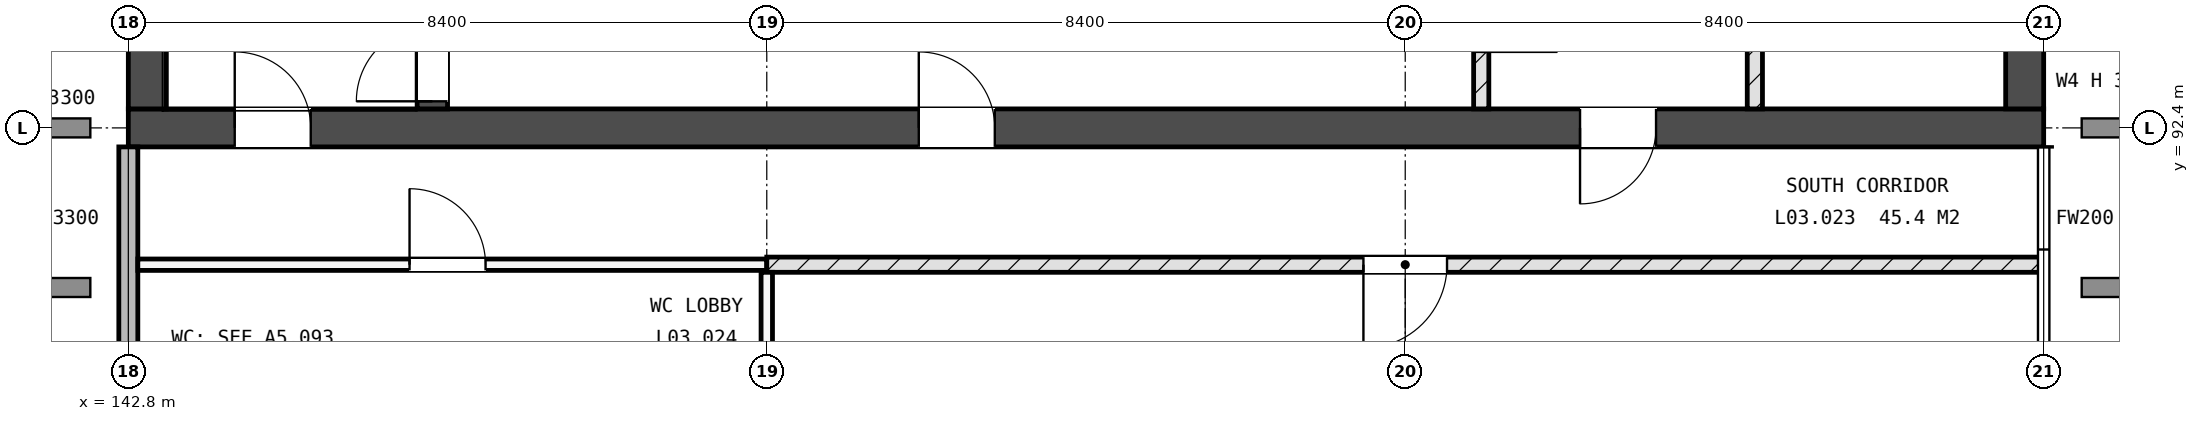
"""IFC4 building model, lengths in metres.
Left out: names, types, materials, properties, quantities, classifications, styles, units other than length and angle.
Written with IfcOpenShell. Run it as: python <this file> out.ifc"""

import sys

from ifc_helpers import new_model, si_unit, direction, frame, frame_2d, origin, place, context, subcontext, project, spatial, rectangle, extrude, element, fill, save


model = new_model("IFC4")
c1 = context("Model", 3, precision=1e-05, world=origin(), true_north=direction((0.0, 1.0)))
c2 = subcontext(c1, "Body", "Model", "MODEL_VIEW")
j1 = project(units=[si_unit("LENGTHUNIT", "METRE"), si_unit("PLANEANGLEUNIT", "RADIAN")], contexts=[c1])
p1 = place(None, origin())
s1 = spatial("IfcSite", under=j1, at=p1, CompositionType="ELEMENT")
p2 = place(p1, origin())
s2 = spatial("IfcBuilding", under=s1, at=p2, CompositionType="ELEMENT")
p3 = place(p2, frame((0.0, 0.0, 14.4)))
s3 = spatial("IfcBuildingStorey", under=s2, at=p3, CompositionType="ELEMENT", Elevation=14.4)
p4 = place(p3, frame((142.8, 92.4, -0.3), z_axis=(0.0, 0.0, 1.0), x_axis=(1.0, 0.0, 0.0)))
e1 = element("IfcWall", 1, at=p4, inside=s3, PredefinedType="SHEAR", context=c2, shape_type="SweptSolid", body=[
    extrude(rectangle(XDim=25.2, YDim=0.5, at=frame_2d((12.6, 0.0))), origin(), (0.0, 0.0, 1.0), 3.65),
])
p5 = place(p4, frame((1.4, 0.0, 0.3)))
e2 = element("IfcOpeningElement", 2, at=p5, cuts=e1, PredefinedType="OPENING", context=c2, shape_type="SweptSolid", body=[
    extrude(rectangle(XDim=1.0, YDim=2.1, at=frame_2d((0.5, 1.05))), frame((0.0, 0.26, 0.0), z_axis=(0.0, -1.0, 0.0), x_axis=(1.0, 0.0, 0.0)), (0.0, 0.0, 1.0), 0.52),
])
p6 = place(p4, frame((19.1, 0.0, 0.3)))
e3 = element("IfcOpeningElement", 3, at=p6, cuts=e1, PredefinedType="OPENING", context=c2, shape_type="SweptSolid", body=[
    extrude(rectangle(XDim=1.0, YDim=2.1, at=frame_2d((0.5, 1.05))), frame((0.0, 0.26, 0.0), z_axis=(0.0, -1.0, 0.0), x_axis=(1.0, 0.0, 0.0)), (0.0, 0.0, 1.0), 0.52),
])
p7 = place(p4, frame((10.4, 0.0, 0.3)))
e4 = element("IfcOpeningElement", 4, at=p7, cuts=e1, PredefinedType="OPENING", context=c2, shape_type="SweptSolid", body=[
    extrude(rectangle(XDim=1.0, YDim=2.1, at=frame_2d((0.5, 1.05))), frame((0.0, 0.26, 0.0), z_axis=(0.0, -1.0, 0.0), x_axis=(1.0, 0.0, 0.0)), (0.0, 0.0, 1.0), 0.52),
])
p8 = place(p3, frame((143.05, 92.65, -0.3), z_axis=(0.0, 0.0, 1.0), x_axis=(0.0, 1.0, 0.0)))
e5 = element("IfcWall", 5, at=p8, inside=s3, PredefinedType="SHEAR", context=c2, shape_type="SweptSolid", body=[
    extrude(rectangle(XDim=16.3, YDim=0.5, at=frame_2d((8.15, 0.0))), origin(), (0.0, 0.0, 1.0), 3.65),
])
p9 = place(p8, frame((2.95, 0.0, 1.9)))
e6 = element("IfcOpeningElement", 6, at=p9, cuts=e5, PredefinedType="OPENING", context=c2, shape_type="SweptSolid", body=[
    extrude(rectangle(XDim=1.2, YDim=0.9, at=frame_2d((0.6, 0.45))), frame((0.0, 0.26, 0.0), z_axis=(0.0, -1.0, 0.0), x_axis=(1.0, 0.0, 0.0)), (0.0, 0.0, 1.0), 0.52),
])
p10 = place(p3, frame((167.75, 92.65, -0.3), z_axis=(0.0, 0.0, 1.0), x_axis=(0.0, 1.0, 0.0)))
e7 = element("IfcWall", 7, at=p10, inside=s3, PredefinedType="SHEAR", context=c2, shape_type="SweptSolid", body=[
    extrude(rectangle(XDim=16.3, YDim=0.5, at=frame_2d((8.15, 0.0))), origin(), (0.0, 0.0, 1.0), 3.65),
])
p11 = place(p10, frame((12.15, 0.0, 1.9)))
e8 = element("IfcOpeningElement", 8, at=p11, cuts=e7, PredefinedType="OPENING", context=c2, shape_type="SweptSolid", body=[
    extrude(rectangle(XDim=1.2, YDim=0.9, at=frame_2d((0.6, 0.45))), frame((0.0, 0.26, 0.0), z_axis=(0.0, -1.0, 0.0), x_axis=(1.0, 0.0, 0.0)), (0.0, 0.0, 1.0), 0.52),
])
p12 = place(p3, frame((146.8, 92.65, -0.3), z_axis=(0.0, 0.0, 1.0), x_axis=(0.0, 1.0, 0.0)))
e9 = element("IfcWall", 9, at=p12, inside=s3, PredefinedType="SHEAR", context=c2, shape_type="SweptSolid", body=[
    extrude(rectangle(XDim=7.475, YDim=0.4, at=frame_2d((3.738, 0.0))), origin(), (0.0, 0.0, 1.0), 3.65),
])
p13 = place(p12, frame((0.1, 0.0, 0.3)))
e10 = element("IfcOpeningElement", 10, at=p13, cuts=e9, PredefinedType="OPENING", context=c2, shape_type="SweptSolid", body=[
    extrude(rectangle(XDim=1.0, YDim=2.1, at=frame_2d((0.5, 1.05))), frame((0.0, 0.21, 0.0), z_axis=(0.0, -1.0, 0.0), x_axis=(1.0, 0.0, 0.0)), (0.0, 0.0, 1.0), 0.42),
])
p14 = place(p3, frame((142.8, 84.5, 0.0), z_axis=(0.0, 0.0, 1.0), x_axis=(0.0, 1.0, 0.0)))
e11 = element("IfcWall", 11, at=p14, inside=s3, PredefinedType="STANDARD", context=c2, shape_type="SweptSolid", body=[
    extrude(rectangle(XDim=7.65, YDim=0.25, at=frame_2d((3.825, 0.0))), origin(), (0.0, 0.0, 1.0), 3.3),
])
p15 = place(p14, frame((2.2, 0.0, 2.1)))
e12 = element("IfcOpeningElement", 12, at=p15, cuts=e11, PredefinedType="OPENING", context=c2, shape_type="SweptSolid", body=[
    extrude(rectangle(XDim=0.9, YDim=0.6, at=frame_2d((0.45, 0.3))), frame((0.0, 0.135, 0.0), z_axis=(0.0, -1.0, 0.0), x_axis=(1.0, 0.0, 0.0)), (0.0, 0.0, 1.0), 0.27),
])
p16 = place(p3, frame((142.925, 90.6, 0.0), z_axis=(0.0, 0.0, 1.0), x_axis=(1.0, 0.0, 0.0)))
e13 = element("IfcWall", 13, at=p16, inside=s3, PredefinedType="PARTITIONING", context=c2, shape_type="SweptSolid", body=[
    extrude(rectangle(XDim=8.275, YDim=0.15, at=frame_2d((4.137, 0.0))), origin(), (0.0, 0.0, 1.0), 3.3),
])
p17 = place(p16, frame((3.575, 0.0, 0.0)))
e14 = element("IfcOpeningElement", 14, at=p17, cuts=e13, PredefinedType="OPENING", context=c2, shape_type="SweptSolid", body=[
    extrude(rectangle(XDim=1.0, YDim=2.1, at=frame_2d((0.5, 1.05))), frame((0.0, 0.085, 0.0), z_axis=(0.0, -1.0, 0.0), x_axis=(1.0, 0.0, 0.0)), (0.0, 0.0, 1.0), 0.17),
])
p18 = place(p3, frame((151.2, 90.6, 0.0), z_axis=(0.0, 0.0, 1.0), x_axis=(1.0, 0.0, 0.0)))
e15 = element("IfcWall", 15, at=p18, inside=s3, PredefinedType="SOLIDWALL", context=c2, shape_type="SweptSolid", body=[
    extrude(rectangle(XDim=16.8, YDim=0.2, at=frame_2d((8.4, 0.0))), origin(), (0.0, 0.0, 1.0), 3.3),
])
p19 = place(p18, frame((7.85, 0.0, 0.0)))
e16 = element("IfcOpeningElement", 16, at=p19, cuts=e15, PredefinedType="OPENING", context=c2, shape_type="SweptSolid", body=[
    extrude(rectangle(XDim=1.1, YDim=2.25, at=frame_2d((0.55, 1.125))), frame((0.0, 0.11, 0.0), z_axis=(0.0, -1.0, 0.0), x_axis=(1.0, 0.0, 0.0)), (0.0, 0.0, 1.0), 0.22),
])
p20 = place(p3, frame((151.2, 84.0, 0.0), z_axis=(0.0, 0.0, 1.0), x_axis=(0.0, 1.0, 0.0)))
e17 = element("IfcWall", 17, at=p20, inside=s3, PredefinedType="PARTITIONING", context=c2, shape_type="SweptSolid", body=[
    extrude(rectangle(XDim=6.5, YDim=0.15, at=frame_2d((3.25, 0.0))), origin(), (0.0, 0.0, 1.0), 2.5),
])
p21 = place(p3, frame((160.6, 92.65, 0.0), z_axis=(0.0, 0.0, 1.0), x_axis=(0.0, 1.0, 0.0)))
e18 = element("IfcWall", 18, at=p21, inside=s3, PredefinedType="SOLIDWALL", context=c2, shape_type="SweptSolid", body=[
    extrude(rectangle(XDim=12.45, YDim=0.2, at=frame_2d((6.225, 0.0))), origin(), (0.0, 0.0, 1.0), 3.3),
])
p22 = place(p21, frame((5.05, 0.0, 0.0)))
e19 = element("IfcOpeningElement", 19, at=p22, cuts=e18, PredefinedType="OPENING", context=c2, shape_type="SweptSolid", body=[
    extrude(rectangle(XDim=0.8, YDim=2.1, at=frame_2d((0.4, 1.05))), frame((0.0, 0.11, 0.0), z_axis=(0.0, -1.0, 0.0), x_axis=(1.0, 0.0, 0.0)), (0.0, 0.0, 1.0), 0.22),
])
p23 = place(p21, frame((0.75, 0.0, 0.0)))
e20 = element("IfcOpeningElement", 20, at=p23, cuts=e18, PredefinedType="OPENING", context=c2, shape_type="SweptSolid", body=[
    extrude(rectangle(XDim=1.0, YDim=2.1, at=frame_2d((0.5, 1.05))), frame((0.0, 0.11, 0.0), z_axis=(0.0, -1.0, 0.0), x_axis=(1.0, 0.0, 0.0)), (0.0, 0.0, 1.0), 0.22),
])
p24 = place(p3, frame((164.2, 92.65, 0.0), z_axis=(0.0, 0.0, 1.0), x_axis=(0.0, 1.0, 0.0)))
e21 = element("IfcWall", 21, at=p24, inside=s3, PredefinedType="SOLIDWALL", context=c2, shape_type="SweptSolid", body=[
    extrude(rectangle(XDim=8.7, YDim=0.2, at=frame_2d((4.35, 0.0))), origin(), (0.0, 0.0, 1.0), 3.3),
])
p25 = place(p24, frame((1.65, 0.0, 0.0)))
e22 = element("IfcOpeningElement", 22, at=p25, cuts=e21, PredefinedType="OPENING", context=c2, shape_type="SweptSolid", body=[
    extrude(rectangle(XDim=0.8, YDim=2.1, at=frame_2d((0.4, 1.05))), frame((0.0, 0.11, 0.0), z_axis=(0.0, -1.0, 0.0), x_axis=(1.0, 0.0, 0.0)), (0.0, 0.0, 1.0), 0.22),
])
p26 = place(p24, frame((6.25, 0.0, 0.0)))
e23 = element("IfcOpeningElement", 23, at=p26, cuts=e21, PredefinedType="OPENING", context=c2, shape_type="SweptSolid", body=[
    extrude(rectangle(XDim=0.8, YDim=2.1, at=frame_2d((0.4, 1.05))), frame((0.0, 0.11, 0.0), z_axis=(0.0, -1.0, 0.0), x_axis=(1.0, 0.0, 0.0)), (0.0, 0.0, 1.0), 0.22),
])
p27 = place(p5, origin())
e24 = element("IfcDoor", 24, at=p27, inside=s3, OperationType="SINGLE_SWING_RIGHT", PredefinedType="DOOR", context=c2, shape_type="SweptSolid", body=[
    extrude(rectangle(XDim=1.0, YDim=2.1, at=frame_2d((0.5, 1.05))), frame((0.0, 0.025, 0.0), z_axis=(0.0, -1.0, 0.0), x_axis=(1.0, 0.0, 0.0)), (0.0, 0.0, 1.0), 0.05),
])
fill(e2, e24)
p28 = place(p13, origin())
e25 = element("IfcDoor", 25, at=p28, inside=s3, OperationType="SINGLE_SWING_RIGHT", PredefinedType="DOOR", context=c2, shape_type="SweptSolid", body=[
    extrude(rectangle(XDim=1.0, YDim=2.1, at=frame_2d((0.5, 1.05))), frame((0.0, 0.025, 0.0), z_axis=(0.0, -1.0, 0.0), x_axis=(1.0, 0.0, 0.0)), (0.0, 0.0, 1.0), 0.05),
])
fill(e10, e25)
p29 = place(p19, origin())
e26 = element("IfcDoor", 26, at=p29, inside=s3, OperationType="SINGLE_SWING_LEFT", PredefinedType="DOOR", context=c2, shape_type="SweptSolid", body=[
    extrude(rectangle(XDim=1.1, YDim=2.25, at=frame_2d((0.55, 1.125))), frame((0.0, 0.025, 0.0), z_axis=(0.0, -1.0, 0.0), x_axis=(1.0, 0.0, 0.0)), (0.0, 0.0, 1.0), 0.05),
])
fill(e16, e26)
p30 = place(p17, origin())
e27 = element("IfcDoor", 27, at=p30, inside=s3, OperationType="SINGLE_SWING_RIGHT", PredefinedType="DOOR", context=c2, shape_type="SweptSolid", body=[
    extrude(rectangle(XDim=1.0, YDim=2.1, at=frame_2d((0.5, 1.05))), frame((0.0, 0.025, 0.0), z_axis=(0.0, -1.0, 0.0), x_axis=(1.0, 0.0, 0.0)), (0.0, 0.0, 1.0), 0.05),
])
fill(e14, e27)
p31 = place(p6, origin())
e28 = element("IfcDoor", 28, at=p31, inside=s3, OperationType="SINGLE_SWING_LEFT", PredefinedType="DOOR", context=c2, shape_type="SweptSolid", body=[
    extrude(rectangle(XDim=1.0, YDim=2.1, at=frame_2d((0.5, 1.05))), frame((0.0, 0.025, 0.0), z_axis=(0.0, -1.0, 0.0), x_axis=(1.0, 0.0, 0.0)), (0.0, 0.0, 1.0), 0.05),
])
fill(e3, e28)
p32 = place(p7, origin())
e29 = element("IfcDoor", 29, at=p32, inside=s3, OperationType="SINGLE_SWING_RIGHT", PredefinedType="DOOR", context=c2, shape_type="SweptSolid", body=[
    extrude(rectangle(XDim=1.0, YDim=2.1, at=frame_2d((0.5, 1.05))), frame((0.0, 0.025, 0.0), z_axis=(0.0, -1.0, 0.0), x_axis=(1.0, 0.0, 0.0)), (0.0, 0.0, 1.0), 0.05),
])
fill(e4, e29)
save(model, sys.argv[1])
